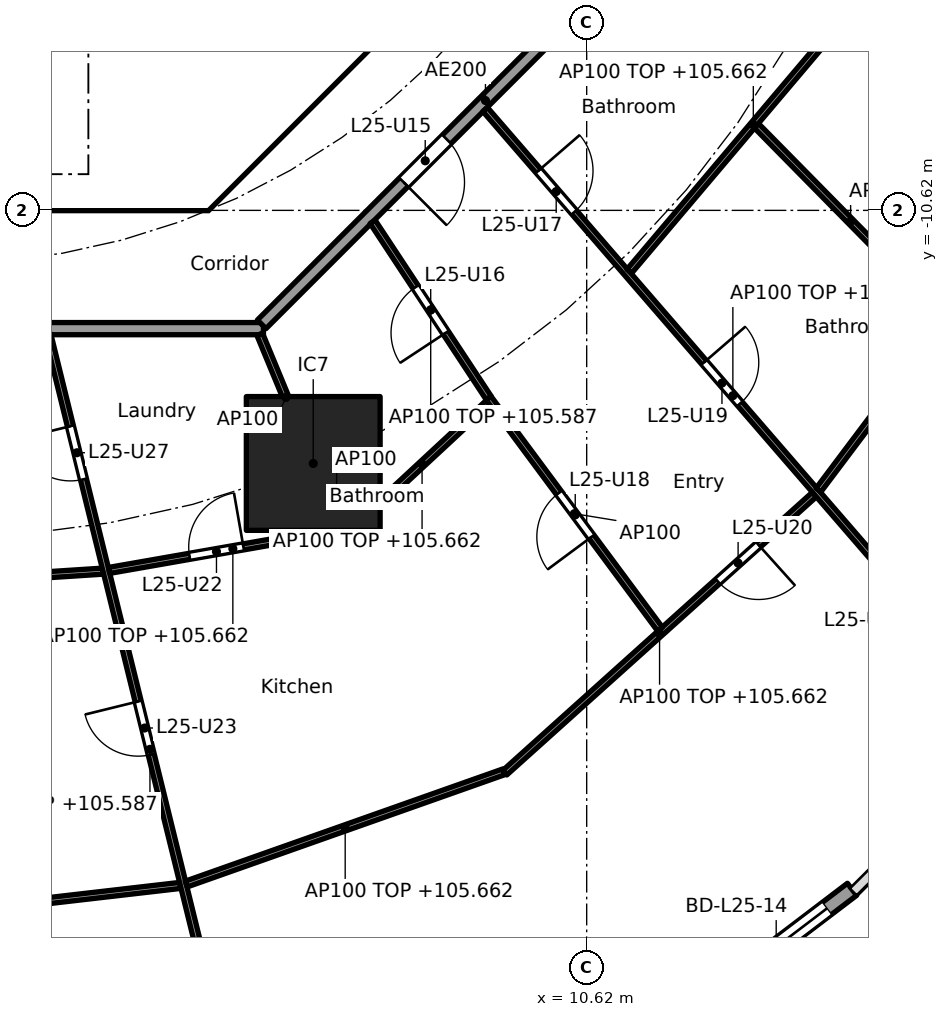
"""IFC4 building model, lengths in metres.
Left out: names, types, materials, properties, quantities, classifications, styles, units other than length and angle.
Written with IfcOpenShell. Run it as: python <this file> out.ifc"""

import sys

from ifc_helpers import new_model, si_unit, direction, frame, frame_2d, origin, origin_2d, place, context, subcontext, project, spatial, polyline, rectangle, outline, extrude, element, fill, save


model = new_model("IFC4")
c1 = context("Model", 3, precision=1e-05, world=origin(), true_north=direction((0.0, 1.0)))
c2 = subcontext(c1, "Body", "Model", "MODEL_VIEW")
j1 = project(units=[si_unit("LENGTHUNIT", "METRE"), si_unit("PLANEANGLEUNIT", "RADIAN")], contexts=[c1])
p1 = place(None, origin())
s1 = spatial("IfcSite", under=j1, at=p1, CompositionType="ELEMENT")
p2 = place(p1, origin())
s2 = spatial("IfcBuilding", under=s1, at=p2, CompositionType="ELEMENT")
p3 = place(p2, frame((0.0, 0.0, 102.9)))
s3 = spatial("IfcBuildingStorey", under=s2, at=p3, CompositionType="ELEMENT", Elevation=102.9)
p4 = place(p3, frame((6.123, -14.782, 0.0), z_axis=(0.0, 0.0, 1.0), x_axis=(1.0, 0.0, 0.0)))
e1 = element("IfcColumn", 1, at=p4, inside=s3, PredefinedType="COLUMN", context=c2, shape_type="SweptSolid", body=[
    extrude(rectangle(XDim=2.2, YDim=2.2, at=origin_2d()), origin(), (0.0, 0.0, 1.0), 3.7),
])
p5 = place(p3, frame((14.984, -21.785, 0.0), z_axis=(0.0, 0.0, 1.0), x_axis=(-0.796037575978, -0.605247203736, 0.0)))
e2 = element("IfcWall", 2, at=p5, inside=s3, PredefinedType="SOLIDWALL", context=c2, shape_type="SweptSolid", body=[
    extrude(rectangle(XDim=3.134, YDim=0.25, at=frame_2d((1.567, 0.0))), origin(), (0.0, 0.0, 1.0), 3.44),
])
p6 = place(p5, frame((0.517, 0.0, 0.0)))
e3 = element("IfcOpeningElement", 3, at=p6, cuts=e2, PredefinedType="OPENING", context=c2, shape_type="SweptSolid", body=[
    extrude(rectangle(XDim=2.1, YDim=2.4, at=frame_2d((1.05, 1.2))), frame((0.0, 0.135, 0.0), z_axis=(0.0, -1.0, 0.0), x_axis=(1.0, 0.0, 0.0)), (0.0, 0.0, 1.0), 0.27),
])
p7 = place(p3, frame((4.613, -9.988, 0.0), z_axis=(0.0, 0.0, 1.0), x_axis=(0.707106781187, 0.707106781187, 0.0)))
e4 = element("IfcWall", 4, at=p7, inside=s3, PredefinedType="SHEAR", context=c2, shape_type="SweptSolid", body=[
    extrude(rectangle(XDim=7.602, YDim=0.6, at=frame_2d((3.801, 0.0))), origin(), (0.0, 0.0, 1.0), 3.44),
])
p8 = place(p7, frame((3.201, 0.0, 0.0)))
e5 = element("IfcOpeningElement", 5, at=p8, cuts=e4, PredefinedType="OPENING", context=c2, shape_type="SweptSolid", body=[
    extrude(rectangle(XDim=1.2, YDim=2.1, at=frame_2d((0.6, 1.05))), frame((0.0, 0.31, 0.0), z_axis=(0.0, -1.0, 0.0), x_axis=(1.0, 0.0, 0.0)), (0.0, 0.0, 1.0), 0.62),
])
p9 = place(p3, frame((4.0, -10.025, 0.0), z_axis=(0.0, 0.0, 1.0), x_axis=(0.0, 1.0, 0.0)))
e6 = element("IfcWall", 6, at=p9, inside=s3, PredefinedType="SOLIDWALL", context=c2, shape_type="SweptSolid", body=[
    extrude(rectangle(XDim=3.0, YDim=0.2, at=frame_2d((1.5, 0.0))), origin(), (0.0, 0.0, 1.0), 3.44),
])
p10 = place(p9, frame((0.975, 0.0, 0.0)))
e7 = element("IfcOpeningElement", 7, at=p10, cuts=e6, PredefinedType="OPENING", context=c2, shape_type="SweptSolid", body=[
    extrude(rectangle(XDim=1.1, YDim=2.1, at=frame_2d((0.55, 1.05))), frame((0.0, 0.11, 0.0), z_axis=(0.0, -1.0, 0.0), x_axis=(1.0, 0.0, 0.0)), (0.0, 0.0, 1.0), 0.22),
])
p11 = place(p3, origin())
e8 = element("IfcWall", 8, at=p11, inside=s3, PredefinedType="SHEAR", context=c2, shape_type="SweptSolid", body=[
    extrude(outline(polyline([(-4.152, -10.025), (4.152, -10.025), (4.401, -9.776), (4.825, -10.2), (4.401, -10.625), (-4.401, -10.625), (-4.825, -10.2), (-4.401, -9.776), (-4.152, -10.025)])), origin(), (0.0, 0.0, 1.0), 3.44),
])
p12 = place(p3, frame((14.82, -6.156, 0.0), z_axis=(0.0, 0.0, 1.0), x_axis=(0.750582231659, -0.660777052808, 0.0)))
e9 = element("IfcWall", 9, at=p12, inside=s3, PredefinedType="PARTITIONING", context=c2, shape_type="SweptSolid", body=[
    extrude(rectangle(XDim=8.781, YDim=0.2, at=frame_2d((4.391, 0.0))), origin(), (0.0, 0.0, 1.0), 2.762),
])
p13 = place(p3, frame((-5.104, -12.565, 0.0), z_axis=(0.0, 0.0, 1.0), x_axis=(1.0, 0.0, 0.0)))
e10 = element("IfcWall", 10, at=p13, inside=s3, PredefinedType="PARTITIONING", context=c2, shape_type="SweptSolid", body=[
    extrude(rectangle(XDim=10.409, YDim=0.2, at=frame_2d((5.205, 0.0))), origin(), (0.0, 0.0, 1.0), 3.44),
])
p14 = place(p3, frame((5.275, -12.494, 0.0), z_axis=(0.0, 0.0, 1.0), x_axis=(0.707106781187, 0.707106781187, 0.0)))
e11 = element("IfcWall", 11, at=p14, inside=s3, PredefinedType="PARTITIONING", context=c2, shape_type="SweptSolid", body=[
    extrude(rectangle(XDim=10.409, YDim=0.2, at=frame_2d((5.205, 0.0))), origin(), (0.0, 0.0, 1.0), 3.44),
])
p15 = place(p14, frame((3.303, 0.0, 0.0)))
e12 = element("IfcOpeningElement", 12, at=p15, cuts=e11, PredefinedType="OPENING", context=c2, shape_type="SweptSolid", body=[
    extrude(rectangle(XDim=1.0, YDim=2.1, at=frame_2d((0.5, 1.05))), frame((0.0, 0.11, 0.0), z_axis=(0.0, -1.0, 0.0), x_axis=(1.0, 0.0, 0.0)), (0.0, 0.0, 1.0), 0.22),
])
p16 = place(p3, frame((-1.703, -16.836, 0.0), z_axis=(0.0, 0.0, 1.0), x_axis=(0.997897941075, 0.064805086209, 0.0)))
e13 = element("IfcWall", 13, at=p16, inside=s3, PredefinedType="PARTITIONING", context=c2, shape_type="SweptSolid", body=[
    extrude(rectangle(XDim=4.378, YDim=0.1, at=frame_2d((2.189, 0.0))), origin(), (0.0, 0.0, 1.0), 2.762),
])
p17 = place(p3, frame((-1.726, -22.375, 0.0), z_axis=(0.0, 0.0, 1.0), x_axis=(0.99339223329, 0.114768771187, 0.0)))
e14 = element("IfcWall", 14, at=p17, inside=s3, PredefinedType="PARTITIONING", context=c2, shape_type="SweptSolid", body=[
    extrude(rectangle(XDim=5.701, YDim=0.1, at=frame_2d((2.851, 0.0))), origin(), (0.0, 0.0, 1.0), 2.762),
])
p18 = place(p17, frame((2.4, 0.0, 0.0)))
e15 = element("IfcOpeningElement", 15, at=p18, cuts=e14, PredefinedType="OPENING", context=c2, shape_type="SweptSolid", body=[
    extrude(rectangle(XDim=0.9, YDim=2.1, at=frame_2d((0.45, 1.05))), frame((0.0, 0.06, 0.0), z_axis=(0.0, -1.0, 0.0), x_axis=(1.0, 0.0, 0.0)), (0.0, 0.0, 1.0), 0.12),
])
p19 = place(p3, frame((1.759, -12.662, 0.0), z_axis=(0.0, 0.0, 1.0), x_axis=(0.239021819854, -0.971014196412, 0.0)))
e16 = element("IfcWall", 16, at=p19, inside=s3, PredefinedType="PARTITIONING", context=c2, shape_type="SweptSolid", body=[
    extrude(rectangle(XDim=14.05, YDim=0.1, at=frame_2d((7.025, 0.0))), origin(), (0.0, 0.0, 1.0), 2.687),
])
p20 = place(p19, frame((6.214, 0.0, 0.0)))
e17 = element("IfcOpeningElement", 17, at=p20, cuts=e16, PredefinedType="OPENING", context=c2, shape_type="SweptSolid", body=[
    extrude(rectangle(XDim=0.9, YDim=2.1, at=frame_2d((0.45, 1.05))), frame((0.0, 0.06, 0.0), z_axis=(0.0, -1.0, 0.0), x_axis=(1.0, 0.0, 0.0)), (0.0, 0.0, 1.0), 0.12),
])
p21 = place(p19, frame((1.552, 0.0, 0.0)))
e18 = element("IfcOpeningElement", 18, at=p21, cuts=e16, PredefinedType="OPENING", context=c2, shape_type="SweptSolid", body=[
    extrude(rectangle(XDim=0.9, YDim=2.1, at=frame_2d((0.45, 1.05))), frame((0.0, 0.06, 0.0), z_axis=(0.0, -1.0, 0.0), x_axis=(1.0, 0.0, 0.0)), (0.0, 0.0, 1.0), 0.12),
])
p22 = place(p3, frame((2.765, -16.541, 0.0), z_axis=(0.0, 0.0, 1.0), x_axis=(0.984998612286, 0.172562260633, 0.0)))
e19 = element("IfcWall", 19, at=p22, inside=s3, PredefinedType="PARTITIONING", context=c2, shape_type="SweptSolid", body=[
    extrude(rectangle(XDim=4.134, YDim=0.1, at=frame_2d((2.067, 0.0))), origin(), (0.0, 0.0, 1.0), 2.762),
])
p23 = place(p22, frame((1.344, 0.0, 0.0)))
e20 = element("IfcOpeningElement", 20, at=p23, cuts=e19, PredefinedType="OPENING", context=c2, shape_type="SweptSolid", body=[
    extrude(rectangle(XDim=0.9, YDim=2.1, at=frame_2d((0.45, 1.05))), frame((0.0, 0.06, 0.0), z_axis=(0.0, -1.0, 0.0), x_axis=(1.0, 0.0, 0.0)), (0.0, 0.0, 1.0), 0.12),
])
p24 = place(p3, frame((4.034, -21.698, 0.0), z_axis=(0.0, 0.0, 1.0), x_axis=(0.942864271692, 0.333177077794, 0.0)))
e21 = element("IfcWall", 21, at=p24, inside=s3, PredefinedType="PARTITIONING", context=c2, shape_type="SweptSolid", body=[
    extrude(rectangle(XDim=5.545, YDim=0.1, at=frame_2d((2.772, 0.0))), origin(), (0.0, 0.0, 1.0), 2.762),
])
p25 = place(p3, frame((5.243, -12.657, 0.0), z_axis=(0.0, 0.0, 1.0), x_axis=(0.382719158442, -0.923864733477, 0.0)))
e22 = element("IfcWall", 22, at=p25, inside=s3, PredefinedType="PARTITIONING", context=c2, shape_type="SweptSolid", body=[
    extrude(rectangle(XDim=2.25, YDim=0.1, at=frame_2d((1.125, 0.0))), origin(), (0.0, 0.0, 1.0), 3.44),
])
p26 = place(p3, frame((6.824, -15.802, 0.0), z_axis=(0.0, 0.0, 1.0), x_axis=(0.733007232109, 0.680220844782, 0.0)))
e23 = element("IfcWall", 23, at=p26, inside=s3, PredefinedType="PARTITIONING", context=c2, shape_type="SweptSolid", body=[
    extrude(rectangle(XDim=2.969, YDim=0.1, at=frame_2d((1.485, 0.0))), origin(), (0.0, 0.0, 1.0), 2.762),
])
p27 = place(p3, frame((9.272, -19.868, 0.0), z_axis=(0.0, 0.0, 1.0), x_axis=(0.743884413566, 0.668308296562, 0.0)))
e24 = element("IfcWall", 24, at=p27, inside=s3, PredefinedType="PARTITIONING", context=c2, shape_type="SweptSolid", body=[
    extrude(rectangle(XDim=6.845, YDim=0.1, at=frame_2d((3.423, 0.0))), origin(), (0.0, 0.0, 1.0), 2.762),
])
p28 = place(p27, frame((4.709, 0.0, 0.0)))
e25 = element("IfcOpeningElement", 25, at=p28, cuts=e24, PredefinedType="OPENING", context=c2, shape_type="SweptSolid", body=[
    extrude(rectangle(XDim=0.9, YDim=2.1, at=frame_2d((0.45, 1.05))), frame((0.0, 0.06, 0.0), z_axis=(0.0, -1.0, 0.0), x_axis=(1.0, 0.0, 0.0)), (0.0, 0.0, 1.0), 0.12),
])
p29 = place(p3, frame((7.1, -10.808, 0.0), z_axis=(0.0, 0.0, 1.0), x_axis=(0.550294419528, -0.834970689208, 0.0)))
e26 = element("IfcWall", 26, at=p29, inside=s3, PredefinedType="PARTITIONING", context=c2, shape_type="SweptSolid", body=[
    extrude(rectangle(XDim=3.472, YDim=0.1, at=frame_2d((1.736, 0.0))), origin(), (0.0, 0.0, 1.0), 2.687),
])
p30 = place(p29, frame((1.286, 0.0, 0.0)))
e27 = element("IfcOpeningElement", 27, at=p30, cuts=e26, PredefinedType="OPENING", context=c2, shape_type="SweptSolid", body=[
    extrude(rectangle(XDim=0.9, YDim=2.1, at=frame_2d((0.45, 1.05))), frame((0.0, 0.06, 0.0), z_axis=(0.0, -1.0, 0.0), x_axis=(1.0, 0.0, 0.0)), (0.0, 0.0, 1.0), 0.12),
])
p31 = place(p3, frame((9.008, -13.708, 0.0), z_axis=(0.0, 0.0, 1.0), x_axis=(0.595845850207, -0.803098825047, 0.0)))
e28 = element("IfcWall", 28, at=p31, inside=s3, PredefinedType="PARTITIONING", context=c2, shape_type="SweptSolid", body=[
    extrude(rectangle(XDim=4.729, YDim=0.1, at=frame_2d((2.365, 0.0))), origin(), (0.0, 0.0, 1.0), 3.44),
])
p32 = place(p31, frame((1.94, 0.0, 0.0)))
e29 = element("IfcOpeningElement", 29, at=p32, cuts=e28, PredefinedType="OPENING", context=c2, shape_type="SweptSolid", body=[
    extrude(rectangle(XDim=0.9, YDim=2.1, at=frame_2d((0.45, 1.05))), frame((0.0, 0.06, 0.0), z_axis=(0.0, -1.0, 0.0), x_axis=(1.0, 0.0, 0.0)), (0.0, 0.0, 1.0), 0.12),
])
p33 = place(p3, frame((8.95, -8.96, 0.0), z_axis=(0.0, 0.0, 1.0), x_axis=(0.65441081073, -0.756139200676, 0.0)))
e30 = element("IfcWall", 30, at=p33, inside=s3, PredefinedType="PARTITIONING", context=c2, shape_type="SweptSolid", body=[
    extrude(rectangle(XDim=12.451, YDim=0.1, at=frame_2d((6.226, 0.0))), origin(), (0.0, 0.0, 1.0), 2.687),
])
p34 = place(p33, frame((1.336, 0.0, 0.0)))
e31 = element("IfcOpeningElement", 31, at=p34, cuts=e30, PredefinedType="OPENING", context=c2, shape_type="SweptSolid", body=[
    extrude(rectangle(XDim=0.9, YDim=2.1, at=frame_2d((0.45, 1.05))), frame((0.0, 0.06, 0.0), z_axis=(0.0, -1.0, 0.0), x_axis=(1.0, 0.0, 0.0)), (0.0, 0.0, 1.0), 0.12),
])
p35 = place(p33, frame((5.501, 0.0, 0.0)))
e32 = element("IfcOpeningElement", 32, at=p35, cuts=e30, PredefinedType="OPENING", context=c2, shape_type="SweptSolid", body=[
    extrude(rectangle(XDim=0.9, YDim=2.1, at=frame_2d((0.45, 1.05))), frame((0.0, 0.06, 0.0), z_axis=(0.0, -1.0, 0.0), x_axis=(1.0, 0.0, 0.0)), (0.0, 0.0, 1.0), 0.12),
])
p36 = place(p33, frame((9.941, 0.0, 0.0)))
e33 = element("IfcOpeningElement", 33, at=p36, cuts=e30, PredefinedType="OPENING", context=c2, shape_type="SweptSolid", body=[
    extrude(rectangle(XDim=0.9, YDim=2.1, at=frame_2d((0.45, 1.05))), frame((0.0, 0.06, 0.0), z_axis=(0.0, -1.0, 0.0), x_axis=(1.0, 0.0, 0.0)), (0.0, 0.0, 1.0), 0.12),
])
p37 = place(p3, frame((11.32, -11.623, 0.0), z_axis=(0.0, 0.0, 1.0), x_axis=(0.646106810963, 0.763247003811, 0.0)))
e34 = element("IfcWall", 34, at=p37, inside=s3, PredefinedType="PARTITIONING", context=c2, shape_type="SweptSolid", body=[
    extrude(rectangle(XDim=6.317, YDim=0.1, at=frame_2d((3.159, 0.0))), origin(), (0.0, 0.0, 1.0), 2.762),
])
p38 = place(p3, frame((14.432, -15.219, 0.0), z_axis=(0.0, 0.0, 1.0), x_axis=(0.601001256685, 0.799248077548, 0.0)))
e35 = element("IfcWall", 35, at=p38, inside=s3, PredefinedType="PARTITIONING", context=c2, shape_type="SweptSolid", body=[
    extrude(rectangle(XDim=6.98, YDim=0.1, at=frame_2d((3.49, 0.0))), origin(), (0.0, 0.0, 1.0), 2.762),
])
p39 = place(p38, frame((4.798, 0.0, 0.0)))
e36 = element("IfcOpeningElement", 36, at=p39, cuts=e35, PredefinedType="OPENING", context=c2, shape_type="SweptSolid", body=[
    extrude(rectangle(XDim=0.9, YDim=2.1, at=frame_2d((0.45, 1.05))), frame((0.0, 0.06, 0.0), z_axis=(0.0, -1.0, 0.0), x_axis=(1.0, 0.0, 0.0)), (0.0, 0.0, 1.0), 0.12),
])
p40 = place(p3, frame((13.412, -9.229, 0.0), z_axis=(0.0, 0.0, 1.0), x_axis=(0.701611164285, -0.712560014421, 0.0)))
e37 = element("IfcWall", 37, at=p40, inside=s3, PredefinedType="PARTITIONING", context=c2, shape_type="SweptSolid", body=[
    extrude(rectangle(XDim=4.415, YDim=0.1, at=frame_2d((2.208, 0.0))), origin(), (0.0, 0.0, 1.0), 3.44),
])
p41 = place(p3, frame((6.781, -15.638, 0.0), z_axis=(0.0, 0.0, 1.0), x_axis=(-0.533419461524, 0.845850860417, 0.0)))
e38 = element("IfcWall", 38, at=p41, inside=s3, PredefinedType="PARTITIONING", context=c2, shape_type="SweptSolid", body=[
    extrude(rectangle(XDim=1.025, YDim=0.1, at=frame_2d((0.513, 0.0))), origin(), (0.0, 0.0, 1.0), 3.44),
])
p42 = place(p6, origin())
e39 = element("IfcDoor", 39, at=p42, inside=s3, OperationType="SLIDING_TO_LEFT", PredefinedType="DOOR", context=c2, shape_type="SweptSolid", body=[
    extrude(rectangle(XDim=2.1, YDim=2.4, at=frame_2d((1.05, 1.2))), frame((0.0, 0.025, 0.0), z_axis=(0.0, -1.0, 0.0), x_axis=(1.0, 0.0, 0.0)), (0.0, 0.0, 1.0), 0.05),
])
fill(e3, e39)
p43 = place(p10, origin())
e40 = element("IfcDoor", 40, at=p43, inside=s3, OperationType="SINGLE_SWING_RIGHT", PredefinedType="DOOR", context=c2, shape_type="SweptSolid", body=[
    extrude(rectangle(XDim=1.1, YDim=2.1, at=frame_2d((0.55, 1.05))), frame((0.0, 0.025, 0.0), z_axis=(0.0, -1.0, 0.0), x_axis=(1.0, 0.0, 0.0)), (0.0, 0.0, 1.0), 0.05),
])
fill(e7, e40)
p44 = place(p15, frame((1.0, 0.0, 0.0), x_axis=(-1.0, 0.0, 0.0)))
e41 = element("IfcDoor", 41, at=p44, inside=s3, OperationType="SINGLE_SWING_RIGHT", PredefinedType="DOOR", context=c2, shape_type="SweptSolid", body=[
    extrude(rectangle(XDim=1.0, YDim=2.1, at=frame_2d((0.5, 1.05))), frame((0.0, 0.025, 0.0), z_axis=(0.0, -1.0, 0.0), x_axis=(1.0, 0.0, 0.0)), (0.0, 0.0, 1.0), 0.05),
])
fill(e12, e41)
p45 = place(p30, frame((0.9, 0.0, 0.0), x_axis=(-1.0, 0.0, 0.0)))
e42 = element("IfcDoor", 42, at=p45, inside=s3, OperationType="SINGLE_SWING_LEFT", PredefinedType="DOOR", context=c2, shape_type="SweptSolid", body=[
    extrude(rectangle(XDim=0.9, YDim=2.1, at=frame_2d((0.45, 1.05))), frame((0.0, 0.025, 0.0), z_axis=(0.0, -1.0, 0.0), x_axis=(1.0, 0.0, 0.0)), (0.0, 0.0, 1.0), 0.05),
])
fill(e27, e42)
p46 = place(p34, origin())
e43 = element("IfcDoor", 43, at=p46, inside=s3, OperationType="SINGLE_SWING_LEFT", PredefinedType="DOOR", context=c2, shape_type="SweptSolid", body=[
    extrude(rectangle(XDim=0.9, YDim=2.1, at=frame_2d((0.45, 1.05))), frame((0.0, 0.025, 0.0), z_axis=(0.0, -1.0, 0.0), x_axis=(1.0, 0.0, 0.0)), (0.0, 0.0, 1.0), 0.05),
])
fill(e31, e43)
p47 = place(p32, frame((0.9, 0.0, 0.0), x_axis=(-1.0, 0.0, 0.0)))
e44 = element("IfcDoor", 44, at=p47, inside=s3, OperationType="SINGLE_SWING_LEFT", PredefinedType="DOOR", context=c2, shape_type="SweptSolid", body=[
    extrude(rectangle(XDim=0.9, YDim=2.1, at=frame_2d((0.45, 1.05))), frame((0.0, 0.025, 0.0), z_axis=(0.0, -1.0, 0.0), x_axis=(1.0, 0.0, 0.0)), (0.0, 0.0, 1.0), 0.05),
])
fill(e29, e44)
p48 = place(p35, origin())
e45 = element("IfcDoor", 45, at=p48, inside=s3, OperationType="SINGLE_SWING_LEFT", PredefinedType="DOOR", context=c2, shape_type="SweptSolid", body=[
    extrude(rectangle(XDim=0.9, YDim=2.1, at=frame_2d((0.45, 1.05))), frame((0.0, 0.025, 0.0), z_axis=(0.0, -1.0, 0.0), x_axis=(1.0, 0.0, 0.0)), (0.0, 0.0, 1.0), 0.05),
])
fill(e32, e45)
p49 = place(p28, frame((0.9, 0.0, 0.0), x_axis=(-1.0, 0.0, 0.0)))
e46 = element("IfcDoor", 46, at=p49, inside=s3, OperationType="SINGLE_SWING_LEFT", PredefinedType="DOOR", context=c2, shape_type="SweptSolid", body=[
    extrude(rectangle(XDim=0.9, YDim=2.1, at=frame_2d((0.45, 1.05))), frame((0.0, 0.025, 0.0), z_axis=(0.0, -1.0, 0.0), x_axis=(1.0, 0.0, 0.0)), (0.0, 0.0, 1.0), 0.05),
])
fill(e25, e46)
p50 = place(p23, origin())
e47 = element("IfcDoor", 47, at=p50, inside=s3, OperationType="SINGLE_SWING_RIGHT", PredefinedType="DOOR", context=c2, shape_type="SweptSolid", body=[
    extrude(rectangle(XDim=0.9, YDim=2.1, at=frame_2d((0.45, 1.05))), frame((0.0, 0.025, 0.0), z_axis=(0.0, -1.0, 0.0), x_axis=(1.0, 0.0, 0.0)), (0.0, 0.0, 1.0), 0.05),
])
fill(e20, e47)
p51 = place(p20, frame((0.9, 0.0, 0.0), x_axis=(-1.0, 0.0, 0.0)))
e48 = element("IfcDoor", 48, at=p51, inside=s3, OperationType="SINGLE_SWING_RIGHT", PredefinedType="DOOR", context=c2, shape_type="SweptSolid", body=[
    extrude(rectangle(XDim=0.9, YDim=2.1, at=frame_2d((0.45, 1.05))), frame((0.0, 0.025, 0.0), z_axis=(0.0, -1.0, 0.0), x_axis=(1.0, 0.0, 0.0)), (0.0, 0.0, 1.0), 0.05),
])
fill(e17, e48)
p52 = place(p21, frame((0.9, 0.0, 0.0), x_axis=(-1.0, 0.0, 0.0)))
e49 = element("IfcDoor", 49, at=p52, inside=s3, OperationType="SINGLE_SWING_RIGHT", PredefinedType="DOOR", context=c2, shape_type="SweptSolid", body=[
    extrude(rectangle(XDim=0.9, YDim=2.1, at=frame_2d((0.45, 1.05))), frame((0.0, 0.025, 0.0), z_axis=(0.0, -1.0, 0.0), x_axis=(1.0, 0.0, 0.0)), (0.0, 0.0, 1.0), 0.05),
])
fill(e18, e49)
save(model, sys.argv[1])
